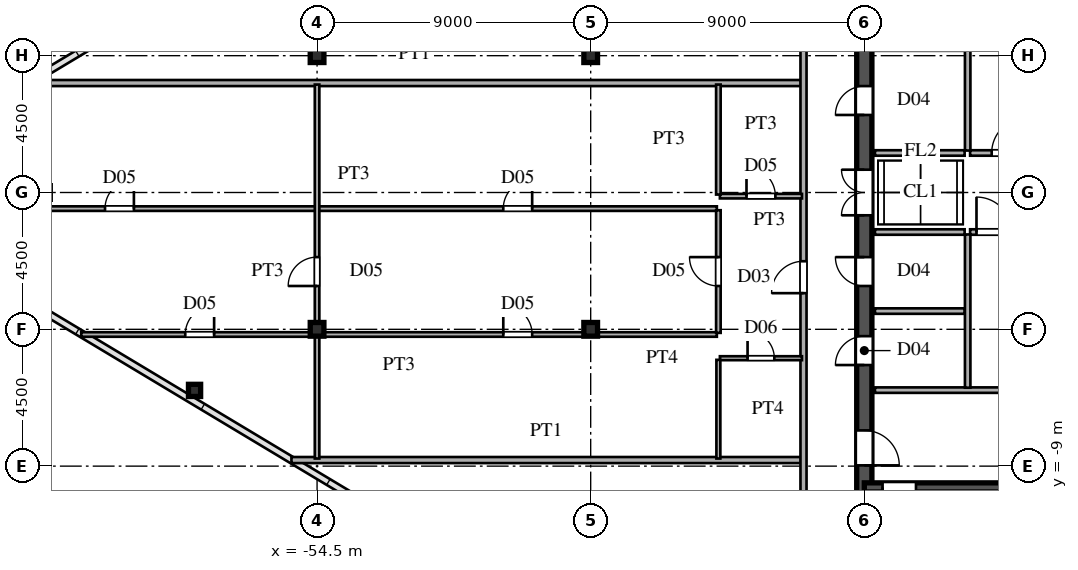
"""IFC4 building model, lengths in metres.
Left out: names, types, materials, properties, quantities, classifications, styles, units other than length and angle.
Written with IfcOpenShell. Run it as: python <this file> out.ifc"""

import sys

from ifc_helpers import new_model, si_unit, direction, frame, frame_2d, origin, origin_2d, place, context, subcontext, project, spatial, rectangle, hollow_rectangle, i_section, extrude, source, transform, mapped, element, fill, save


model = new_model("IFC4")
c1 = context("Model", 3, precision=1e-05, world=origin(), true_north=direction((0.0, 1.0)))
c2 = subcontext(c1, "Body", "Model", "MODEL_VIEW")
j1 = project(units=[si_unit("LENGTHUNIT", "METRE"), si_unit("PLANEANGLEUNIT", "RADIAN")], contexts=[c1])
p1 = place(None, origin())
s1 = spatial("IfcSite", under=j1, at=p1, CompositionType="ELEMENT")
p2 = place(p1, origin())
s2 = spatial("IfcBuilding", under=s1, at=p2, CompositionType="ELEMENT")
p3 = place(p2, frame((0.0, 0.0, 243.15)))
s3 = spatial("IfcBuildingStorey", under=s2, at=p3, CompositionType="ELEMENT", Elevation=243.15)
m1 = source(origin(), c2, "Body", "SweptSolid", [
    extrude(i_section(OverallWidth=0.45, OverallDepth=0.45, WebThickness=0.016, FlangeThickness=0.025, at=origin_2d()), origin(), (0.0, 0.0, 1.0), 3.75),
])
for number, where, z_axis, x_axis in (
    (1, (-45.5, -4.5, 0.0), (0.0, 0.0, 1.0), (1.0, 0.0, 0.0)),
    (2, (-45.5, 4.5, 0.0), (0.0, 0.0, 1.0), (1.0, 0.0, 0.0)),
    (3, (-54.5, -4.5, 0.0), (0.0, 0.0, 1.0), (1.0, 0.0, 0.0)),
    (4, (-54.5, 4.5, 0.0), (0.0, 0.0, 1.0), (1.0, 0.0, 0.0)),
):
    element("IfcColumn", number, at=place(p3, frame(where, z_axis=z_axis, x_axis=x_axis)), inside=s3, PredefinedType="COLUMN", context=c2, shape_type="MappedRepresentation", body=[
        mapped(m1, transform((0.0, 0.0, 0.0), scale=1.0)),
    ])
m2 = source(origin(), c2, "Body", "SweptSolid", [
    extrude(hollow_rectangle(XDim=0.4, YDim=0.4, WallThickness=0.016, at=origin_2d()), origin(), (0.0, 0.0, 1.0), 3.75),
])
p4 = place(p3, frame((-58.53, -6.509, 0.0), z_axis=(0.0, 0.0, 1.0), x_axis=(1.0, 0.0, 0.0)))
e5 = element("IfcColumn", 5, at=p4, inside=s3, PredefinedType="COLUMN", context=c2, shape_type="MappedRepresentation", body=[
    mapped(m2, transform((0.0, 0.0, 0.0), scale=1.0)),
])
p5 = place(p3, frame((-36.5, -13.65, 0.0), z_axis=(0.0, 0.0, 1.0), x_axis=(0.0, 1.0, 0.0)))
e6 = element("IfcWall", 6, at=p5, inside=s3, PredefinedType="SHEAR", context=c2, shape_type="SweptSolid", body=[
    extrude(rectangle(XDim=7.15, YDim=0.5, at=frame_2d((3.575, 0.0))), origin(), (0.0, 0.0, 1.0), 3.53),
])
p6 = place(p5, frame((4.675, 0.0, 0.0)))
e7 = element("IfcOpeningElement", 7, at=p6, cuts=e6, PredefinedType="OPENING", context=c2, shape_type="SweptSolid", body=[
    extrude(rectangle(XDim=1.15, YDim=2.2, at=frame_2d((0.575, 1.1))), frame((0.0, 0.26, 0.0), z_axis=(0.0, -1.0, 0.0), x_axis=(1.0, 0.0, 0.0)), (0.0, 0.0, 1.0), 0.52),
])
p7 = place(p3, frame((-36.5, -1.3, 0.0), z_axis=(0.0, 0.0, 1.0), x_axis=(0.0, 1.0, 0.0)))
e8 = element("IfcWall", 8, at=p7, inside=s3, PredefinedType="SHEAR", context=c2, shape_type="SweptSolid", body=[
    extrude(rectangle(XDim=2.6, YDim=0.5, at=frame_2d((1.3, 0.0))), origin(), (0.0, 0.0, 1.0), 3.53),
])
p8 = place(p7, frame((0.55, 0.0, 0.0)))
e9 = element("IfcOpeningElement", 9, at=p8, cuts=e8, PredefinedType="OPENING", context=c2, shape_type="SweptSolid", body=[
    extrude(rectangle(XDim=1.5, YDim=2.3, at=frame_2d((0.75, 1.15))), frame((0.0, 0.26, 0.0), z_axis=(0.0, -1.0, 0.0), x_axis=(1.0, 0.0, 0.0)), (0.0, 0.0, 1.0), 0.52),
])
p9 = place(p3, frame((-36.5, -6.5, 0.0), z_axis=(0.0, 0.0, 1.0), x_axis=(0.0, 1.0, 0.0)))
e10 = element("IfcWall", 10, at=p9, inside=s3, PredefinedType="SHEAR", context=c2, shape_type="SweptSolid", body=[
    extrude(rectangle(XDim=2.6, YDim=0.5, at=frame_2d((1.3, 0.0))), origin(), (0.0, 0.0, 1.0), 3.53),
])
p10 = place(p9, frame((0.825, 0.0, 0.0)))
e11 = element("IfcOpeningElement", 11, at=p10, cuts=e10, PredefinedType="OPENING", context=c2, shape_type="SweptSolid", body=[
    extrude(rectangle(XDim=0.95, YDim=2.15, at=frame_2d((0.475, 1.075))), frame((0.0, 0.26, 0.0), z_axis=(0.0, -1.0, 0.0), x_axis=(1.0, 0.0, 0.0)), (0.0, 0.0, 1.0), 0.52),
])
p11 = place(p3, frame((-36.5, -3.9, 0.0), z_axis=(0.0, 0.0, 1.0), x_axis=(0.0, 1.0, 0.0)))
e12 = element("IfcWall", 12, at=p11, inside=s3, PredefinedType="SHEAR", context=c2, shape_type="SweptSolid", body=[
    extrude(rectangle(XDim=2.6, YDim=0.5, at=frame_2d((1.3, 0.0))), origin(), (0.0, 0.0, 1.0), 3.53),
])
p12 = place(p11, frame((0.825, 0.0, 0.0)))
e13 = element("IfcOpeningElement", 13, at=p12, cuts=e12, PredefinedType="OPENING", context=c2, shape_type="SweptSolid", body=[
    extrude(rectangle(XDim=0.95, YDim=2.15, at=frame_2d((0.475, 1.075))), frame((0.0, 0.26, 0.0), z_axis=(0.0, -1.0, 0.0), x_axis=(1.0, 0.0, 0.0)), (0.0, 0.0, 1.0), 0.52),
])
p13 = place(p3, frame((-36.5, 1.3, 0.0), z_axis=(0.0, 0.0, 1.0), x_axis=(0.0, 1.0, 0.0)))
e14 = element("IfcWall", 14, at=p13, inside=s3, PredefinedType="SHEAR", context=c2, shape_type="SweptSolid", body=[
    extrude(rectangle(XDim=3.45, YDim=0.5, at=frame_2d((1.725, 0.0))), origin(), (0.0, 0.0, 1.0), 3.53),
])
p14 = place(p13, frame((1.25, 0.0, 0.0)))
e15 = element("IfcOpeningElement", 15, at=p14, cuts=e14, PredefinedType="OPENING", context=c2, shape_type="SweptSolid", body=[
    extrude(rectangle(XDim=0.95, YDim=2.15, at=frame_2d((0.475, 1.075))), frame((0.0, 0.26, 0.0), z_axis=(0.0, -1.0, 0.0), x_axis=(1.0, 0.0, 0.0)), (0.0, 0.0, 1.0), 0.52),
])
p15 = place(p3, frame((-36.5, -9.7, 0.0), z_axis=(0.0, 0.0, 1.0), x_axis=(1.0, 0.0, 0.0)))
e16 = element("IfcWall", 16, at=p15, inside=s3, PredefinedType="SHEAR", context=c2, shape_type="SweptSolid", body=[
    extrude(rectangle(XDim=9.0, YDim=0.3, at=frame_2d((4.5, 0.0))), origin(), (0.0, 0.0, 1.0), 3.53),
])
p16 = place(p15, frame((0.6, 0.0, 0.0)))
e17 = element("IfcOpeningElement", 17, at=p16, cuts=e16, PredefinedType="OPENING", context=c2, shape_type="SweptSolid", body=[
    extrude(rectangle(XDim=1.1, YDim=2.2, at=frame_2d((0.55, 1.1))), frame((0.0, 0.16, 0.0), z_axis=(0.0, -1.0, 0.0), x_axis=(1.0, 0.0, 0.0)), (0.0, 0.0, 1.0), 0.32),
])
p17 = place(p3, frame((-36.15, -6.5, 0.0), z_axis=(0.0, 0.0, 1.0), x_axis=(1.0, 0.0, 0.0)))
e18 = element("IfcWall", 18, at=p17, inside=s3, PredefinedType="PARTITIONING", context=c2, shape_type="SweptSolid", body=[
    extrude(rectangle(XDim=5.7, YDim=0.18, at=frame_2d((2.85, 0.0))), origin(), (0.0, 0.0, 1.0), 3.53),
])
p18 = place(p3, frame((-33.1, -6.42, 0.0), z_axis=(0.0, 0.0, 1.0), x_axis=(0.0, 1.0, 0.0)))
e19 = element("IfcWall", 19, at=p18, inside=s3, PredefinedType="PARTITIONING", context=c2, shape_type="SweptSolid", body=[
    extrude(rectangle(XDim=5.04, YDim=0.18, at=frame_2d((2.52, 0.0))), origin(), (0.0, 0.0, 1.0), 3.53),
])
p19 = place(p3, frame((-33.1, 1.38, 0.0), z_axis=(0.0, 0.0, 1.0), x_axis=(0.0, 1.0, 0.0)))
e20 = element("IfcWall", 20, at=p19, inside=s3, PredefinedType="PARTITIONING", context=c2, shape_type="SweptSolid", body=[
    extrude(rectangle(XDim=6.74, YDim=0.18, at=frame_2d((3.37, 0.0))), origin(), (0.0, 0.0, 1.0), 3.53),
])
p20 = place(p3, frame((-33.02, -1.3, 0.0), z_axis=(0.0, 0.0, 1.0), x_axis=(1.0, 0.0, 0.0)))
e21 = element("IfcWall", 21, at=p20, inside=s3, PredefinedType="PARTITIONING", context=c2, shape_type="SweptSolid", body=[
    extrude(rectangle(XDim=2.72, YDim=0.18, at=frame_2d((1.36, 0.0))), origin(), (0.0, 0.0, 1.0), 3.53),
])
p21 = place(p20, frame((0.21, 0.0, 0.0)))
e22 = element("IfcOpeningElement", 22, at=p21, cuts=e21, PredefinedType="OPENING", context=c2, shape_type="SweptSolid", body=[
    extrude(rectangle(XDim=1.15, YDim=2.2, at=frame_2d((0.575, 1.1))), frame((0.0, 0.1, 0.0), z_axis=(0.0, -1.0, 0.0), x_axis=(1.0, 0.0, 0.0)), (0.0, 0.0, 1.0), 0.2),
])
p22 = place(p3, frame((-33.02, 1.3, 0.0), z_axis=(0.0, 0.0, 1.0), x_axis=(1.0, 0.0, 0.0)))
e23 = element("IfcWall", 23, at=p22, inside=s3, PredefinedType="PARTITIONING", context=c2, shape_type="SweptSolid", body=[
    extrude(rectangle(XDim=2.57, YDim=0.18, at=frame_2d((1.285, 0.0))), origin(), (0.0, 0.0, 1.0), 3.53),
])
p23 = place(p22, frame((0.71, 0.0, 0.0)))
e24 = element("IfcOpeningElement", 24, at=p23, cuts=e23, PredefinedType="OPENING", context=c2, shape_type="SweptSolid", body=[
    extrude(rectangle(XDim=1.15, YDim=2.2, at=frame_2d((0.575, 1.1))), frame((0.0, 0.1, 0.0), z_axis=(0.0, -1.0, 0.0), x_axis=(1.0, 0.0, 0.0)), (0.0, 0.0, 1.0), 0.2),
])
for number, where, z_axis, x_axis in (
    (25, (-36.15, -1.3, 0.0), (0.0, 0.0, 1.0), (1.0, 0.0, 0.0)),
    (26, (-36.15, 1.3, 0.0), (0.0, 0.0, 1.0), (1.0, 0.0, 0.0)),
    (27, (-36.15, -3.9, 0.0), (0.0, 0.0, 1.0), (1.0, 0.0, 0.0)),
):
    element("IfcWall", number, at=place(p3, frame(where, z_axis=z_axis, x_axis=x_axis)), inside=s3, PredefinedType="PARTITIONING", context=c2, shape_type="SweptSolid", body=[
        extrude(rectangle(XDim=2.95, YDim=0.18, at=frame_2d((1.475, 0.0))), origin(), (0.0, 0.0, 1.0), 3.53),
    ])
p24 = place(p3, frame((-55.343, -8.8, 0.0), z_axis=(0.0, 0.0, 1.0), x_axis=(1.0, 0.0, 0.0)))
e28 = element("IfcWall", 28, at=p24, inside=s3, PredefinedType="PARTITIONING", context=c2, shape_type="SweptSolid", body=[
    extrude(rectangle(XDim=16.763, YDim=0.2, at=frame_2d((8.381, 0.0))), origin(), (0.0, 0.0, 1.0), 3.53),
])
p25 = place(p3, frame((-41.25, -5.45, 0.0), z_axis=(0.0, 0.0, 1.0), x_axis=(1.0, 0.0, 0.0)))
e29 = element("IfcWall", 29, at=p25, inside=s3, PredefinedType="PARTITIONING", context=c2, shape_type="SweptSolid", body=[
    extrude(rectangle(XDim=2.7, YDim=0.13, at=frame_2d((1.35, 0.0))), origin(), (0.0, 0.0, 1.0), 3.53),
])
p26 = place(p25, frame((0.91, 0.0, 0.0)))
e30 = element("IfcOpeningElement", 30, at=p26, cuts=e29, PredefinedType="OPENING", context=c2, shape_type="SweptSolid", body=[
    extrude(rectangle(XDim=0.88, YDim=2.1, at=frame_2d((0.44, 1.05))), frame((0.0, 0.075, 0.0), z_axis=(0.0, -1.0, 0.0), x_axis=(1.0, 0.0, 0.0)), (0.0, 0.0, 1.0), 0.15),
])
p27 = place(p3, frame((-62.257, -4.67, 0.0), z_axis=(0.0, 0.0, 1.0), x_axis=(1.0, 0.0, 0.0)))
e31 = element("IfcWall", 31, at=p27, inside=s3, PredefinedType="PARTITIONING", context=c2, shape_type="SweptSolid", body=[
    extrude(rectangle(XDim=20.907, YDim=0.15, at=frame_2d((10.454, 0.0))), origin(), (0.0, 0.0, 1.0), 3.53),
])
p28 = place(p27, frame((13.882, 0.0, 0.0)))
e32 = element("IfcOpeningElement", 32, at=p28, cuts=e31, PredefinedType="OPENING", context=c2, shape_type="SweptSolid", body=[
    extrude(rectangle(XDim=0.95, YDim=2.15, at=frame_2d((0.475, 1.075))), frame((0.0, 0.085, 0.0), z_axis=(0.0, -1.0, 0.0), x_axis=(1.0, 0.0, 0.0)), (0.0, 0.0, 1.0), 0.17),
])
p29 = place(p27, frame((3.421, 0.0, 0.0)))
e33 = element("IfcOpeningElement", 33, at=p29, cuts=e31, PredefinedType="OPENING", context=c2, shape_type="SweptSolid", body=[
    extrude(rectangle(XDim=0.95, YDim=2.15, at=frame_2d((0.475, 1.075))), frame((0.0, 0.085, 0.0), z_axis=(0.0, -1.0, 0.0), x_axis=(1.0, 0.0, 0.0)), (0.0, 0.0, 1.0), 0.17),
])
p30 = place(p3, frame((-67.535, -0.53, 0.0), z_axis=(0.0, 0.0, 1.0), x_axis=(1.0, 0.0, 0.0)))
e34 = element("IfcWall", 34, at=p30, inside=s3, PredefinedType="PARTITIONING", context=c2, shape_type="SweptSolid", body=[
    extrude(rectangle(XDim=26.185, YDim=0.15, at=frame_2d((13.092, 0.0))), origin(), (0.0, 0.0, 1.0), 3.53),
])
p31 = place(p30, frame((19.16, 0.0, 0.0)))
e35 = element("IfcOpeningElement", 35, at=p31, cuts=e34, PredefinedType="OPENING", context=c2, shape_type="SweptSolid", body=[
    extrude(rectangle(XDim=0.95, YDim=2.15, at=frame_2d((0.475, 1.075))), frame((0.0, 0.085, 0.0), z_axis=(0.0, -1.0, 0.0), x_axis=(1.0, 0.0, 0.0)), (0.0, 0.0, 1.0), 0.17),
])
p32 = place(p30, frame((6.06, 0.0, 0.0)))
e36 = element("IfcOpeningElement", 36, at=p32, cuts=e34, PredefinedType="OPENING", context=c2, shape_type="SweptSolid", body=[
    extrude(rectangle(XDim=0.95, YDim=2.15, at=frame_2d((0.475, 1.075))), frame((0.0, 0.085, 0.0), z_axis=(0.0, -1.0, 0.0), x_axis=(1.0, 0.0, 0.0)), (0.0, 0.0, 1.0), 0.17),
])
p33 = place(p3, frame((-41.25, -0.12, 0.0), z_axis=(0.0, 0.0, 1.0), x_axis=(1.0, 0.0, 0.0)))
e37 = element("IfcWall", 37, at=p33, inside=s3, PredefinedType="PARTITIONING", context=c2, shape_type="SweptSolid", body=[
    extrude(rectangle(XDim=2.7, YDim=0.15, at=frame_2d((1.35, 0.0))), origin(), (0.0, 0.0, 1.0), 3.53),
])
p34 = place(p33, frame((0.875, 0.0, 0.0)))
e38 = element("IfcOpeningElement", 38, at=p34, cuts=e37, PredefinedType="OPENING", context=c2, shape_type="SweptSolid", body=[
    extrude(rectangle(XDim=0.95, YDim=2.15, at=frame_2d((0.475, 1.075))), frame((0.0, 0.085, 0.0), z_axis=(0.0, -1.0, 0.0), x_axis=(1.0, 0.0, 0.0)), (0.0, 0.0, 1.0), 0.17),
])
p35 = place(p3, frame((-64.01, 3.6, 0.0), z_axis=(0.0, 0.0, 1.0), x_axis=(1.0, 0.0, 0.0)))
e39 = element("IfcWall", 39, at=p35, inside=s3, PredefinedType="PARTITIONING", context=c2, shape_type="SweptSolid", body=[
    extrude(rectangle(XDim=25.43, YDim=0.2, at=frame_2d((12.715, 0.0))), origin(), (0.0, 0.0, 1.0), 3.53),
])
p36 = place(p3, frame((-54.5, -8.75, 0.0), z_axis=(0.0, 0.0, 1.0), x_axis=(0.0, 1.0, 0.0)))
e40 = element("IfcWall", 40, at=p36, inside=s3, PredefinedType="PARTITIONING", context=c2, shape_type="SweptSolid", body=[
    extrude(rectangle(XDim=12.3, YDim=0.15, at=frame_2d((6.15, 0.0))), origin(), (0.0, 0.0, 1.0), 2.93),
])
p37 = place(p36, frame((5.675, 0.0, 0.0)))
e41 = element("IfcOpeningElement", 41, at=p37, cuts=e40, PredefinedType="OPENING", context=c2, shape_type="SweptSolid", body=[
    extrude(rectangle(XDim=0.95, YDim=2.15, at=frame_2d((0.475, 1.075))), frame((0.0, 0.085, 0.0), z_axis=(0.0, -1.0, 0.0), x_axis=(1.0, 0.0, 0.0)), (0.0, 0.0, 1.0), 0.17),
])
p38 = place(p3, frame((-41.3, -8.75, 0.0), z_axis=(0.0, 0.0, 1.0), x_axis=(0.0, 1.0, 0.0)))
e42 = element("IfcWall", 42, at=p38, inside=s3, PredefinedType="PARTITIONING", context=c2, shape_type="SweptSolid", body=[
    extrude(rectangle(XDim=3.246, YDim=0.13, at=frame_2d((1.623, 0.0))), origin(), (0.0, 0.0, 1.0), 3.53),
])
p39 = place(p3, frame((-41.3, -4.617, 0.0), z_axis=(0.0, 0.0, 1.0), x_axis=(0.0, 1.0, 0.0)))
e43 = element("IfcWall", 43, at=p39, inside=s3, PredefinedType="PARTITIONING", context=c2, shape_type="SweptSolid", body=[
    extrude(rectangle(XDim=4.034, YDim=0.15, at=frame_2d((2.017, 0.0))), origin(), (0.0, 0.0, 1.0), 3.53),
])
p40 = place(p39, frame((1.542, 0.0, 0.0)))
e44 = element("IfcOpeningElement", 44, at=p40, cuts=e43, PredefinedType="OPENING", context=c2, shape_type="SweptSolid", body=[
    extrude(rectangle(XDim=0.95, YDim=2.15, at=frame_2d((0.475, 1.075))), frame((0.0, 0.085, 0.0), z_axis=(0.0, -1.0, 0.0), x_axis=(1.0, 0.0, 0.0)), (0.0, 0.0, 1.0), 0.17),
])
p41 = place(p3, frame((-41.3, -0.068, 0.0), z_axis=(0.0, 0.0, 1.0), x_axis=(0.0, 1.0, 0.0)))
e45 = element("IfcWall", 45, at=p41, inside=s3, PredefinedType="PARTITIONING", context=c2, shape_type="SweptSolid", body=[
    extrude(rectangle(XDim=3.618, YDim=0.15, at=frame_2d((1.809, 0.0))), origin(), (0.0, 0.0, 1.0), 3.53),
])
p42 = place(p3, frame((-38.5, -15.515, 0.0), z_axis=(0.0, 0.0, 1.0), x_axis=(0.0, 1.0, 0.0)))
e46 = element("IfcWall", 46, at=p42, inside=s3, PredefinedType="PARTITIONING", context=c2, shape_type="SweptSolid", body=[
    extrude(rectangle(XDim=31.03, YDim=0.2, at=frame_2d((15.515, 0.0))), origin(), (0.0, 0.0, 1.0), 3.53),
])
p43 = place(p42, frame((2.79, 0.0, 0.0)))
e47 = element("IfcOpeningElement", 47, at=p43, cuts=e46, PredefinedType="OPENING", context=c2, shape_type="SweptSolid", body=[
    extrude(rectangle(XDim=1.05, YDim=2.25, at=frame_2d((0.525, 1.125))), frame((0.0, 0.11, 0.0), z_axis=(0.0, -1.0, 0.0), x_axis=(1.0, 0.0, 0.0)), (0.0, 0.0, 1.0), 0.22),
])
p44 = place(p42, frame((12.204, 0.0, 0.0)))
e48 = element("IfcOpeningElement", 48, at=p44, cuts=e46, PredefinedType="OPENING", context=c2, shape_type="SweptSolid", body=[
    extrude(rectangle(XDim=1.05, YDim=2.25, at=frame_2d((0.525, 1.125))), frame((0.0, 0.11, 0.0), z_axis=(0.0, -1.0, 0.0), x_axis=(1.0, 0.0, 0.0)), (0.0, 0.0, 1.0), 0.22),
])
p45 = place(p42, frame((24.59, 0.0, 0.0)))
e49 = element("IfcOpeningElement", 49, at=p45, cuts=e46, PredefinedType="OPENING", context=c2, shape_type="SweptSolid", body=[
    extrude(rectangle(XDim=1.05, YDim=2.25, at=frame_2d((0.525, 1.125))), frame((0.0, 0.11, 0.0), z_axis=(0.0, -1.0, 0.0), x_axis=(1.0, 0.0, 0.0)), (0.0, 0.0, 1.0), 0.22),
])
m3 = source(origin(), c2, "Body", "SweptSolid", [
    extrude(rectangle(XDim=1.15, YDim=2.2, at=frame_2d((0.575, 1.1))), frame((0.0, 0.025, 0.0), z_axis=(0.0, -1.0, 0.0), x_axis=(1.0, 0.0, 0.0)), (0.0, 0.0, 1.0), 0.05),
])
p46 = place(p6, frame((1.15, 0.0, 0.0), z_axis=(0.0, 0.0, 1.0), x_axis=(-1.0, 0.0, 0.0)))
e50 = element("IfcDoor", 50, at=p46, inside=s3, OperationType="SINGLE_SWING_LEFT", PredefinedType="DOOR", context=c2, shape_type="MappedRepresentation", body=[
    mapped(m3, transform((0.0, 0.0, 0.0), scale=1.0)),
])
fill(e7, e50)
m4 = source(origin(), c2, "Body", "SweptSolid", [
    extrude(rectangle(XDim=1.5, YDim=2.3, at=frame_2d((0.75, 1.15))), frame((0.0, 0.025, 0.0), z_axis=(0.0, -1.0, 0.0), x_axis=(1.0, 0.0, 0.0)), (0.0, 0.0, 1.0), 0.05),
])
p47 = place(p8, origin())
e51 = element("IfcDoor", 51, at=p47, inside=s3, OperationType="DOUBLE_SWING_LEFT", PredefinedType="DOOR", context=c2, shape_type="MappedRepresentation", body=[
    mapped(m4, transform((0.0, 0.0, 0.0), scale=1.0)),
])
fill(e9, e51)
m5 = source(origin(), c2, "Body", "SweptSolid", [
    extrude(rectangle(XDim=0.95, YDim=2.15, at=frame_2d((0.475, 1.075))), frame((0.0, 0.025, 0.0), z_axis=(0.0, -1.0, 0.0), x_axis=(1.0, 0.0, 0.0)), (0.0, 0.0, 1.0), 0.05),
])
p48 = place(p10, origin())
e52 = element("IfcDoor", 52, at=p48, inside=s3, OperationType="SINGLE_SWING_LEFT", PredefinedType="DOOR", context=c2, shape_type="MappedRepresentation", body=[
    mapped(m5, transform((0.0, 0.0, 0.0), scale=1.0)),
])
fill(e11, e52)
p49 = place(p12, origin())
e53 = element("IfcDoor", 53, at=p49, inside=s3, OperationType="SINGLE_SWING_RIGHT", PredefinedType="DOOR", context=c2, shape_type="MappedRepresentation", body=[
    mapped(m5, transform((0.0, 0.0, 0.0), scale=1.0)),
])
fill(e13, e53)
p50 = place(p14, origin())
e54 = element("IfcDoor", 54, at=p50, inside=s3, OperationType="SINGLE_SWING_LEFT", PredefinedType="DOOR", context=c2, shape_type="MappedRepresentation", body=[
    mapped(m5, transform((0.0, 0.0, 0.0), scale=1.0)),
])
fill(e15, e54)
m6 = source(origin(), c2, "Body", "SweptSolid", [
    extrude(rectangle(XDim=1.1, YDim=2.2, at=frame_2d((0.55, 1.1))), frame((0.0, 0.025, 0.0), z_axis=(0.0, -1.0, 0.0), x_axis=(1.0, 0.0, 0.0)), (0.0, 0.0, 1.0), 0.05),
])
p51 = place(p16, frame((1.1, 0.0, 0.0), z_axis=(0.0, 0.0, 1.0), x_axis=(-1.0, 0.0, 0.0)))
e55 = element("IfcDoor", 55, at=p51, inside=s3, OperationType="SINGLE_SWING_LEFT", PredefinedType="DOOR", context=c2, shape_type="MappedRepresentation", body=[
    mapped(m6, transform((0.0, 0.0, 0.0), scale=1.0)),
])
fill(e17, e55)
p52 = place(p21, origin())
e56 = element("IfcDoor", 56, at=p52, inside=s3, OperationType="SINGLE_SWING_LEFT", PredefinedType="DOOR", context=c2, shape_type="MappedRepresentation", body=[
    mapped(m3, transform((0.0, 0.0, 0.0), scale=1.0)),
])
fill(e22, e56)
p53 = place(p23, origin())
e57 = element("IfcDoor", 57, at=p53, inside=s3, OperationType="SINGLE_SWING_RIGHT", PredefinedType="DOOR", context=c2, shape_type="MappedRepresentation", body=[
    mapped(m3, transform((0.0, 0.0, 0.0), scale=1.0)),
])
fill(e24, e57)
m7 = source(origin(), c2, "Body", "SweptSolid", [
    extrude(rectangle(XDim=0.88, YDim=2.1, at=frame_2d((0.44, 1.05))), frame((0.0, 0.025, 0.0), z_axis=(0.0, -1.0, 0.0), x_axis=(1.0, 0.0, 0.0)), (0.0, 0.0, 1.0), 0.05),
])
p54 = place(p26, origin())
e58 = element("IfcDoor", 58, at=p54, inside=s3, OperationType="SINGLE_SWING_LEFT", PredefinedType="DOOR", context=c2, shape_type="MappedRepresentation", body=[
    mapped(m7, transform((0.0, 0.0, 0.0), scale=1.0)),
])
fill(e30, e58)
m8 = source(origin(), c2, "Body", "SweptSolid", [
    extrude(rectangle(XDim=0.95, YDim=2.15, at=frame_2d((0.475, 1.075))), frame((0.0, 0.025, 0.0), z_axis=(0.0, -1.0, 0.0), x_axis=(1.0, 0.0, 0.0)), (0.0, 0.0, 1.0), 0.05),
])
p55 = place(p28, origin())
e59 = element("IfcDoor", 59, at=p55, inside=s3, OperationType="SINGLE_SWING_LEFT", PredefinedType="DOOR", context=c2, shape_type="MappedRepresentation", body=[
    mapped(m8, transform((0.0, 0.0, 0.0), scale=1.0)),
])
fill(e32, e59)
p56 = place(p29, origin())
e60 = element("IfcDoor", 60, at=p56, inside=s3, OperationType="SINGLE_SWING_RIGHT", PredefinedType="DOOR", context=c2, shape_type="MappedRepresentation", body=[
    mapped(m8, transform((0.0, 0.0, 0.0), scale=1.0)),
])
fill(e33, e60)
p57 = place(p31, origin())
e61 = element("IfcDoor", 61, at=p57, inside=s3, OperationType="SINGLE_SWING_RIGHT", PredefinedType="DOOR", context=c2, shape_type="MappedRepresentation", body=[
    mapped(m8, transform((0.0, 0.0, 0.0), scale=1.0)),
])
fill(e35, e61)
p58 = place(p32, origin())
e62 = element("IfcDoor", 62, at=p58, inside=s3, OperationType="SINGLE_SWING_RIGHT", PredefinedType="DOOR", context=c2, shape_type="MappedRepresentation", body=[
    mapped(m8, transform((0.0, 0.0, 0.0), scale=1.0)),
])
fill(e36, e62)
p59 = place(p34, origin())
e63 = element("IfcDoor", 63, at=p59, inside=s3, OperationType="SINGLE_SWING_LEFT", PredefinedType="DOOR", context=c2, shape_type="MappedRepresentation", body=[
    mapped(m8, transform((0.0, 0.0, 0.0), scale=1.0)),
])
fill(e38, e63)
p60 = place(p37, origin())
e64 = element("IfcDoor", 64, at=p60, inside=s3, OperationType="SINGLE_SWING_LEFT", PredefinedType="DOOR", context=c2, shape_type="MappedRepresentation", body=[
    mapped(m8, transform((0.0, 0.0, 0.0), scale=1.0)),
])
fill(e41, e64)
p61 = place(p40, origin())
e65 = element("IfcDoor", 65, at=p61, inside=s3, OperationType="SINGLE_SWING_RIGHT", PredefinedType="DOOR", context=c2, shape_type="MappedRepresentation", body=[
    mapped(m8, transform((0.0, 0.0, 0.0), scale=1.0)),
])
fill(e44, e65)
m9 = source(origin(), c2, "Body", "SweptSolid", [
    extrude(rectangle(XDim=1.05, YDim=2.25, at=frame_2d((0.525, 1.125))), frame((0.0, 0.025, 0.0), z_axis=(0.0, -1.0, 0.0), x_axis=(1.0, 0.0, 0.0)), (0.0, 0.0, 1.0), 0.05),
])
p62 = place(p44, origin())
e66 = element("IfcDoor", 66, at=p62, inside=s3, OperationType="SINGLE_SWING_LEFT", PredefinedType="DOOR", context=c2, shape_type="MappedRepresentation", body=[
    mapped(m9, transform((0.0, 0.0, 0.0), scale=1.0)),
])
fill(e48, e66)
save(model, sys.argv[1])
